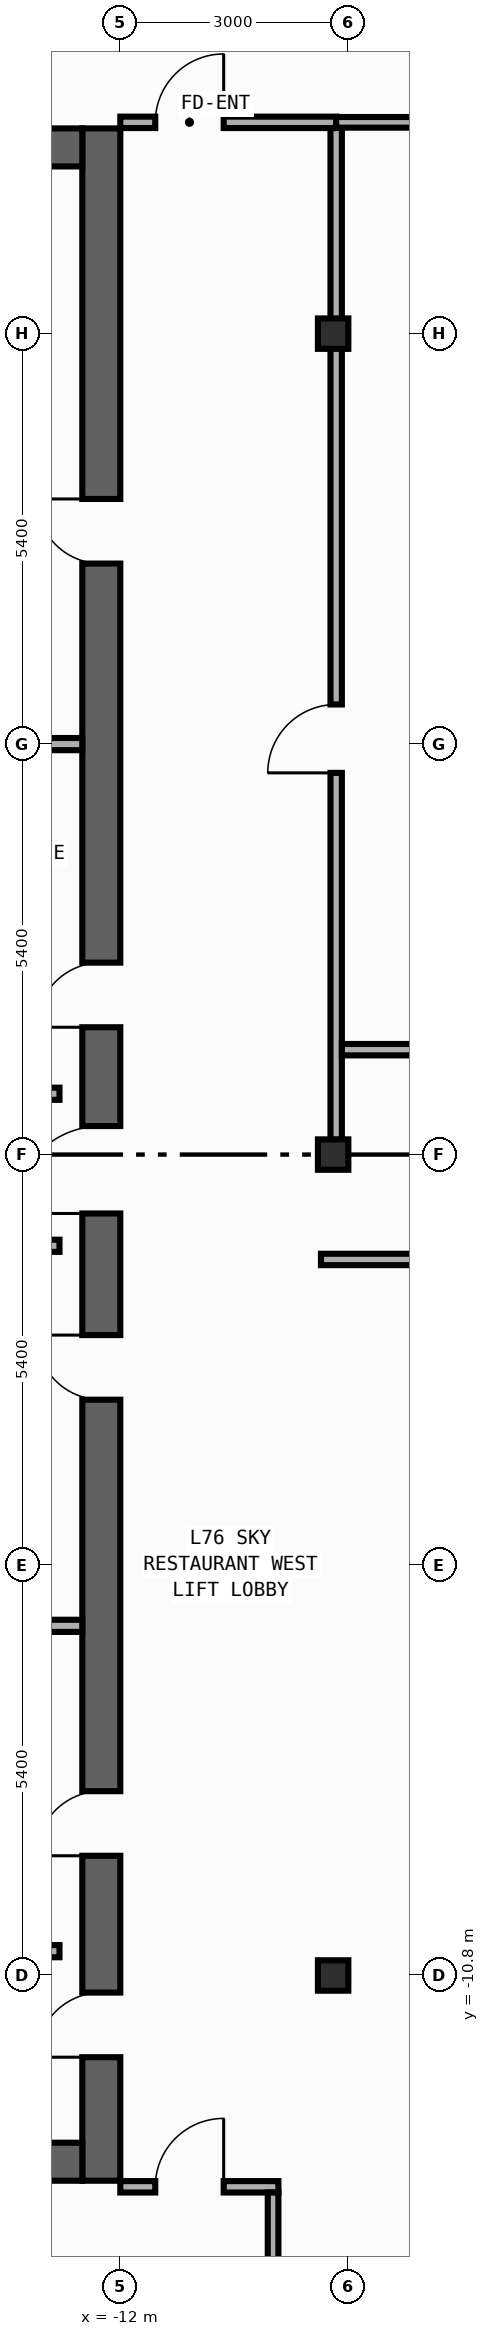
"""IFC4 building model, lengths in metres.
Left out: names, types, materials, properties, quantities, classifications, styles, units other than length and angle.
Written with IfcOpenShell. Run it as: python <this file> out.ifc"""

import sys

from ifc_helpers import new_model, si_unit, direction, frame, frame_2d, origin, origin_2d, place, context, subcontext, project, spatial, rectangle, i_section, extrude, element, fill, save


model = new_model("IFC4")
c1 = context("Model", 3, precision=1e-05, world=origin(), true_north=direction((0.0, 1.0)))
c2 = subcontext(c1, "Body", "Model", "MODEL_VIEW")
j1 = project(units=[si_unit("LENGTHUNIT", "METRE"), si_unit("PLANEANGLEUNIT", "RADIAN")], contexts=[c1])
p1 = place(None, origin())
s1 = spatial("IfcSite", under=j1, at=p1, CompositionType="ELEMENT")
p2 = place(p1, origin())
s2 = spatial("IfcBuilding", under=s1, at=p2, CompositionType="ELEMENT")
p3 = place(p2, frame((0.0, 0.0, 315.6)))
s3 = spatial("IfcBuildingStorey", under=s2, at=p3, CompositionType="ELEMENT", Elevation=315.6)
p4 = place(p3, frame((-12.25, -13.5, 0.0), z_axis=(0.0, 0.0, 1.0), x_axis=(0.0, 1.0, 0.0)))
e1 = element("IfcWall", 1, at=p4, inside=s3, PredefinedType="SHEAR", context=c2, shape_type="SweptSolid", body=[
    extrude(rectangle(XDim=27.0, YDim=0.5, at=frame_2d((13.5, 0.0))), origin(), (0.0, 0.0, 1.0), 4.54),
])
p5 = place(p4, frame((15.175, 0.0, 0.0)))
e2 = element("IfcOpeningElement", 2, at=p5, cuts=e1, PredefinedType="OPENING", context=c2, shape_type="SweptSolid", body=[
    extrude(rectangle(XDim=0.85, YDim=2.1, at=frame_2d((0.425, 1.05))), frame((0.0, 0.26, 0.0), z_axis=(0.0, -1.0, 0.0), x_axis=(1.0, 0.0, 0.0)), (0.0, 0.0, 1.0), 0.52),
])
p6 = place(p4, frame((21.275, 0.0, 0.0)))
e3 = element("IfcOpeningElement", 3, at=p6, cuts=e1, PredefinedType="OPENING", context=c2, shape_type="SweptSolid", body=[
    extrude(rectangle(XDim=0.85, YDim=2.1, at=frame_2d((0.425, 1.05))), frame((0.0, 0.26, 0.0), z_axis=(0.0, -1.0, 0.0), x_axis=(1.0, 0.0, 0.0)), (0.0, 0.0, 1.0), 0.52),
])
p7 = place(p4, frame((4.275, 0.0, 0.0)))
e4 = element("IfcOpeningElement", 4, at=p7, cuts=e1, PredefinedType="OPENING", context=c2, shape_type="SweptSolid", body=[
    extrude(rectangle(XDim=0.85, YDim=2.1, at=frame_2d((0.425, 1.05))), frame((0.0, 0.26, 0.0), z_axis=(0.0, -1.0, 0.0), x_axis=(1.0, 0.0, 0.0)), (0.0, 0.0, 1.0), 0.52),
])
p8 = place(p4, frame((10.275, 0.0, 0.0)))
e5 = element("IfcOpeningElement", 5, at=p8, cuts=e1, PredefinedType="OPENING", context=c2, shape_type="SweptSolid", body=[
    extrude(rectangle(XDim=0.85, YDim=2.1, at=frame_2d((0.425, 1.05))), frame((0.0, 0.26, 0.0), z_axis=(0.0, -1.0, 0.0), x_axis=(1.0, 0.0, 0.0)), (0.0, 0.0, 1.0), 0.52),
])
p9 = place(p4, frame((12.725, 0.0, 0.0)))
e6 = element("IfcOpeningElement", 6, at=p9, cuts=e1, PredefinedType="OPENING", context=c2, shape_type="SweptSolid", body=[
    extrude(rectangle(XDim=1.15, YDim=2.2, at=frame_2d((0.575, 1.1))), frame((0.0, 0.26, 0.0), z_axis=(0.0, -1.0, 0.0), x_axis=(1.0, 0.0, 0.0)), (0.0, 0.0, 1.0), 0.52),
])
p10 = place(p4, frame((1.625, 0.0, 0.0)))
e7 = element("IfcOpeningElement", 7, at=p10, cuts=e1, PredefinedType="OPENING", context=c2, shape_type="SweptSolid", body=[
    extrude(rectangle(XDim=0.85, YDim=2.1, at=frame_2d((0.425, 1.05))), frame((0.0, 0.26, 0.0), z_axis=(0.0, -1.0, 0.0), x_axis=(1.0, 0.0, 0.0)), (0.0, 0.0, 1.0), 0.52),
])
for number, where, z_axis, x_axis in (
    (8, (-19.9, -13.25, 0.0), (0.0, 0.0, 1.0), (1.0, 0.0, 0.0)),
    (9, (-19.9, 13.25, 0.0), (0.0, 0.0, 1.0), (1.0, 0.0, 0.0)),
):
    element("IfcWall", number, at=place(p3, frame(where, z_axis=z_axis, x_axis=x_axis)), inside=s3, PredefinedType="SHEAR", context=c2, shape_type="SweptSolid", body=[
        extrude(rectangle(XDim=7.4, YDim=0.5, at=frame_2d((3.7, 0.0))), origin(), (0.0, 0.0, 1.0), 4.54),
    ])
for number, where, z_axis, x_axis in (
    (10, (-9.2, -10.8, 0.0), (0.0, 0.0, 1.0), (1.0, 0.0, 0.0)),
    (11, (-9.2, 0.0, 0.0), (0.0, 0.0, 1.0), (1.0, 0.0, 0.0)),
    (12, (-9.2, 10.8, 0.0), (0.0, 0.0, 1.0), (1.0, 0.0, 0.0)),
):
    element("IfcColumn", number, at=place(p3, frame(where, z_axis=z_axis, x_axis=x_axis)), inside=s3, PredefinedType="COLUMN", context=c2, shape_type="SweptSolid", body=[
        extrude(i_section(OverallWidth=0.4, OverallDepth=0.4, WebThickness=0.013, FlangeThickness=0.021, FilletRadius=0.022, at=origin_2d()), origin(), (0.0, 0.0, 1.0), 4.8),
    ])
for number, where, z_axis, x_axis in (
    (13, (-15.4, 0.8, 0.0), (0.0, 0.0, 1.0), (1.0, 0.0, 0.0)),
    (14, (-15.4, -1.2, 0.0), (0.0, 0.0, 1.0), (1.0, 0.0, 0.0)),
    (15, (-15.4, -10.48, 0.0), (0.0, 0.0, 1.0), (1.0, 0.0, 0.0)),
):
    element("IfcWall", number, at=place(p3, frame(where, z_axis=z_axis, x_axis=x_axis)), inside=s3, PredefinedType="STANDARD", context=c2, shape_type="SweptSolid", body=[
        extrude(rectangle(XDim=2.6, YDim=0.16, at=frame_2d((1.3, 0.0))), origin(), (0.0, 0.0, 1.0), 4.54),
    ])
for number, where, z_axis, x_axis in (
    (16, (-15.4, 5.4, 0.0), (0.0, 0.0, 1.0), (1.0, 0.0, 0.0)),
    (17, (-15.4, -6.2, 0.0), (0.0, 0.0, 1.0), (1.0, 0.0, 0.0)),
):
    element("IfcWall", number, at=place(p3, frame(where, z_axis=z_axis, x_axis=x_axis)), inside=s3, PredefinedType="PARTITIONING", context=c2, shape_type="SweptSolid", body=[
        extrude(rectangle(XDim=2.9, YDim=0.16, at=frame_2d((1.45, 0.0))), origin(), (0.0, 0.0, 1.0), 4.54),
    ])
p11 = place(p3, frame((-12.0, 13.58, 0.0), z_axis=(0.0, 0.0, 1.0), x_axis=(1.0, 0.0, 0.0)))
e18 = element("IfcWall", 18, at=p11, inside=s3, PredefinedType="PARTITIONING", context=c2, shape_type="SweptSolid", body=[
    extrude(rectangle(XDim=2.84, YDim=0.15, at=frame_2d((1.42, 0.0))), origin(), (0.0, 0.0, 1.0), 4.54),
])
p12 = place(p11, frame((0.46, 0.0, 0.0)))
e19 = element("IfcOpeningElement", 19, at=p12, cuts=e18, PredefinedType="OPENING", context=c2, shape_type="SweptSolid", body=[
    extrude(rectangle(XDim=0.9, YDim=2.15, at=frame_2d((0.45, 1.075))), frame((0.0, 0.085, 0.0), z_axis=(0.0, -1.0, 0.0), x_axis=(1.0, 0.0, 0.0)), (0.0, 0.0, 1.0), 0.17),
])
p13 = place(p3, frame((-9.16, 0.196, 0.0), z_axis=(0.0, 0.0, 1.0), x_axis=(0.0, 1.0, 0.0)))
e20 = element("IfcWall", 20, at=p13, inside=s3, PredefinedType="PARTITIONING", context=c2, shape_type="SweptSolid", body=[
    extrude(rectangle(XDim=13.309, YDim=0.15, at=frame_2d((6.655, 0.0))), origin(), (0.0, 0.0, 1.0), 3.64),
])
p14 = place(p13, frame((4.826, 0.0, 0.0)))
e21 = element("IfcOpeningElement", 21, at=p14, cuts=e20, PredefinedType="OPENING", context=c2, shape_type="SweptSolid", body=[
    extrude(rectangle(XDim=0.9, YDim=2.15, at=frame_2d((0.45, 1.075))), frame((0.0, 0.085, 0.0), z_axis=(0.0, -1.0, 0.0), x_axis=(1.0, 0.0, 0.0)), (0.0, 0.0, 1.0), 0.17),
])
p15 = place(p3, frame((-12.0, -13.58, 0.0), z_axis=(0.0, 0.0, 1.0), x_axis=(1.0, 0.0, 0.0)))
e22 = element("IfcWall", 22, at=p15, inside=s3, PredefinedType="PARTITIONING", context=c2, shape_type="SweptSolid", body=[
    extrude(rectangle(XDim=2.08, YDim=0.15, at=frame_2d((1.04, 0.0))), origin(), (0.0, 0.0, 1.0), 4.54),
])
p16 = place(p15, frame((0.46, 0.0, 0.0)))
e23 = element("IfcOpeningElement", 23, at=p16, cuts=e22, PredefinedType="OPENING", context=c2, shape_type="SweptSolid", body=[
    extrude(rectangle(XDim=0.9, YDim=2.15, at=frame_2d((0.45, 1.075))), frame((0.0, 0.085, 0.0), z_axis=(0.0, -1.0, 0.0), x_axis=(1.0, 0.0, 0.0)), (0.0, 0.0, 1.0), 0.17),
])
p17 = place(p3, frame((-9.36, -1.38, 0.0), z_axis=(0.0, 0.0, 1.0), x_axis=(1.0, 0.0, 0.0)))
e24 = element("IfcWall", 24, at=p17, inside=s3, PredefinedType="PARTITIONING", context=c2, shape_type="SweptSolid", body=[
    extrude(rectangle(XDim=18.72, YDim=0.15, at=frame_2d((9.36, 0.0))), origin(), (0.0, 0.0, 1.0), 4.54),
])
p18 = place(p17, frame((8.91, 0.0, 0.0)))
e25 = element("IfcOpeningElement", 25, at=p18, cuts=e24, PredefinedType="OPENING", context=c2, shape_type="SweptSolid", body=[
    extrude(rectangle(XDim=0.9, YDim=2.15, at=frame_2d((0.45, 1.075))), frame((0.0, 0.085, 0.0), z_axis=(0.0, -1.0, 0.0), x_axis=(1.0, 0.0, 0.0)), (0.0, 0.0, 1.0), 0.17),
])
p19 = place(p3, frame((-9.085, 1.38, 0.0), z_axis=(0.0, 0.0, 1.0), x_axis=(1.0, 0.0, 0.0)))
e26 = element("IfcWall", 26, at=p19, inside=s3, PredefinedType="PARTITIONING", context=c2, shape_type="SweptSolid", body=[
    extrude(rectangle(XDim=7.665, YDim=0.15, at=frame_2d((3.833, 0.0))), origin(), (0.0, 0.0, 1.0), 4.54),
])
p20 = place(p19, frame((6.305, 0.0, 0.0)))
e27 = element("IfcOpeningElement", 27, at=p20, cuts=e26, PredefinedType="OPENING", context=c2, shape_type="SweptSolid", body=[
    extrude(rectangle(XDim=0.9, YDim=2.15, at=frame_2d((0.45, 1.075))), frame((0.0, 0.085, 0.0), z_axis=(0.0, -1.0, 0.0), x_axis=(1.0, 0.0, 0.0)), (0.0, 0.0, 1.0), 0.17),
])
p21 = place(p3, frame((-9.99, -24.055, 0.0), z_axis=(0.0, 0.0, 1.0), x_axis=(0.0, 1.0, 0.0)))
e28 = element("IfcWall", 28, at=p21, inside=s3, PredefinedType="PARTITIONING", context=c2, shape_type="SweptSolid", body=[
    extrude(rectangle(XDim=10.4, YDim=0.14, at=frame_2d((5.2, 0.0))), origin(), (0.0, 0.0, 1.0), 4.54),
])
p22 = place(p3, frame((-9.16, 13.58, 0.0), z_axis=(0.0, 0.0, 1.0), x_axis=(1.0, 0.0, 0.0)))
e29 = element("IfcWall", 29, at=p22, inside=s3, PredefinedType="PARTITIONING", context=c2, shape_type="SweptSolid", body=[
    extrude(rectangle(XDim=7.9, YDim=0.14, at=frame_2d((3.95, 0.0))), origin(), (0.0, 0.0, 1.0), 4.54),
])
p23 = place(p5, origin())
e30 = element("IfcDoor", 30, at=p23, inside=s3, OperationType="SINGLE_SWING_LEFT", PredefinedType="DOOR", context=c2, shape_type="SweptSolid", body=[
    extrude(rectangle(XDim=0.85, YDim=2.1, at=frame_2d((0.425, 1.05))), frame((0.0, 0.025, 0.0), z_axis=(0.0, -1.0, 0.0), x_axis=(1.0, 0.0, 0.0)), (0.0, 0.0, 1.0), 0.05),
])
fill(e2, e30)
p24 = place(p6, origin())
e31 = element("IfcDoor", 31, at=p24, inside=s3, OperationType="SINGLE_SWING_RIGHT", PredefinedType="DOOR", context=c2, shape_type="SweptSolid", body=[
    extrude(rectangle(XDim=0.85, YDim=2.1, at=frame_2d((0.425, 1.05))), frame((0.0, 0.025, 0.0), z_axis=(0.0, -1.0, 0.0), x_axis=(1.0, 0.0, 0.0)), (0.0, 0.0, 1.0), 0.05),
])
fill(e3, e31)
p25 = place(p7, origin())
e32 = element("IfcDoor", 32, at=p25, inside=s3, OperationType="SINGLE_SWING_LEFT", PredefinedType="DOOR", context=c2, shape_type="SweptSolid", body=[
    extrude(rectangle(XDim=0.85, YDim=2.1, at=frame_2d((0.425, 1.05))), frame((0.0, 0.025, 0.0), z_axis=(0.0, -1.0, 0.0), x_axis=(1.0, 0.0, 0.0)), (0.0, 0.0, 1.0), 0.05),
])
fill(e4, e32)
p26 = place(p8, origin())
e33 = element("IfcDoor", 33, at=p26, inside=s3, OperationType="SINGLE_SWING_RIGHT", PredefinedType="DOOR", context=c2, shape_type="SweptSolid", body=[
    extrude(rectangle(XDim=0.85, YDim=2.1, at=frame_2d((0.425, 1.05))), frame((0.0, 0.025, 0.0), z_axis=(0.0, -1.0, 0.0), x_axis=(1.0, 0.0, 0.0)), (0.0, 0.0, 1.0), 0.05),
])
fill(e5, e33)
p27 = place(p9, origin())
e34 = element("IfcDoor", 34, at=p27, inside=s3, OperationType="SINGLE_SWING_LEFT", PredefinedType="DOOR", context=c2, shape_type="SweptSolid", body=[
    extrude(rectangle(XDim=1.15, YDim=2.2, at=frame_2d((0.575, 1.1))), frame((0.0, 0.025, 0.0), z_axis=(0.0, -1.0, 0.0), x_axis=(1.0, 0.0, 0.0)), (0.0, 0.0, 1.0), 0.05),
])
fill(e6, e34)
p28 = place(p10, origin())
e35 = element("IfcDoor", 35, at=p28, inside=s3, OperationType="SINGLE_SWING_LEFT", PredefinedType="DOOR", context=c2, shape_type="SweptSolid", body=[
    extrude(rectangle(XDim=0.85, YDim=2.1, at=frame_2d((0.425, 1.05))), frame((0.0, 0.025, 0.0), z_axis=(0.0, -1.0, 0.0), x_axis=(1.0, 0.0, 0.0)), (0.0, 0.0, 1.0), 0.05),
])
fill(e7, e35)
p29 = place(p12, origin())
e36 = element("IfcDoor", 36, at=p29, inside=s3, OperationType="SINGLE_SWING_RIGHT", PredefinedType="DOOR", context=c2, shape_type="SweptSolid", body=[
    extrude(rectangle(XDim=0.9, YDim=2.15, at=frame_2d((0.45, 1.075))), frame((0.0, 0.025, 0.0), z_axis=(0.0, -1.0, 0.0), x_axis=(1.0, 0.0, 0.0)), (0.0, 0.0, 1.0), 0.05),
])
fill(e19, e36)
p30 = place(p14, origin())
e37 = element("IfcDoor", 37, at=p30, inside=s3, OperationType="SINGLE_SWING_LEFT", PredefinedType="DOOR", context=c2, shape_type="SweptSolid", body=[
    extrude(rectangle(XDim=0.9, YDim=2.15, at=frame_2d((0.45, 1.075))), frame((0.0, 0.025, 0.0), z_axis=(0.0, -1.0, 0.0), x_axis=(1.0, 0.0, 0.0)), (0.0, 0.0, 1.0), 0.05),
])
fill(e21, e37)
p31 = place(p16, origin())
e38 = element("IfcDoor", 38, at=p31, inside=s3, OperationType="SINGLE_SWING_RIGHT", PredefinedType="DOOR", context=c2, shape_type="SweptSolid", body=[
    extrude(rectangle(XDim=0.9, YDim=2.15, at=frame_2d((0.45, 1.075))), frame((0.0, 0.025, 0.0), z_axis=(0.0, -1.0, 0.0), x_axis=(1.0, 0.0, 0.0)), (0.0, 0.0, 1.0), 0.05),
])
fill(e23, e38)
save(model, sys.argv[1])
